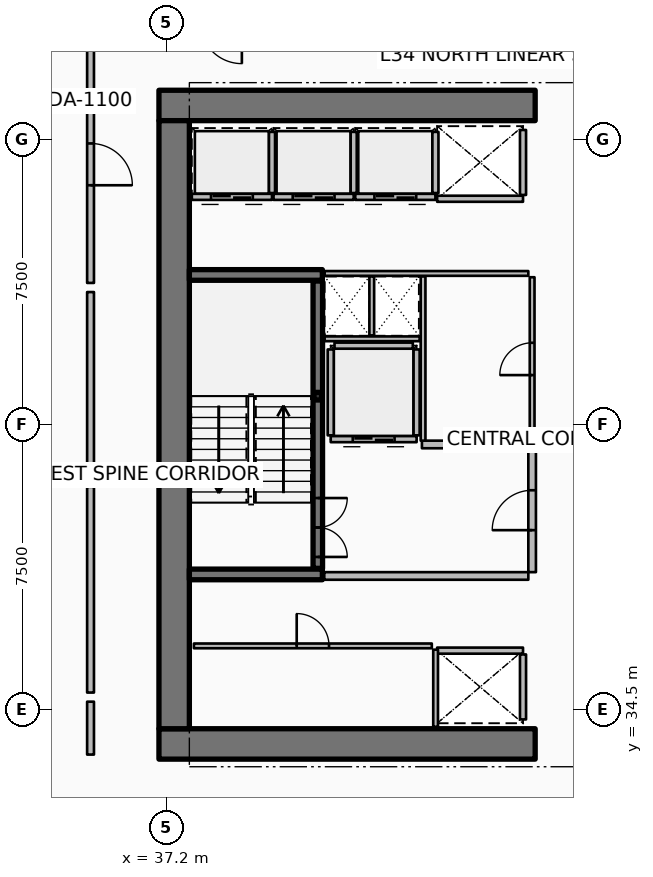
"""IFC4 building model, lengths in metres.
Left out: names, types, materials, properties, quantities, classifications, styles, units other than length and angle.
Written with IfcOpenShell. Run it as: python <this file> out.ifc"""

import sys

from ifc_helpers import new_model, si_unit, direction, frame, frame_2d, origin, origin_2d, place, context, subcontext, project, spatial, rectangle, hollow_rectangle, extrude, element, fill, save


model = new_model("IFC4")
c1 = context("Model", 3, precision=1e-05, world=origin(), true_north=direction((0.0, 1.0)))
c2 = subcontext(c1, "Body", "Model", "MODEL_VIEW")
j1 = project(units=[si_unit("LENGTHUNIT", "METRE"), si_unit("PLANEANGLEUNIT", "RADIAN")], contexts=[c1])
p1 = place(None, origin())
s1 = spatial("IfcSite", under=j1, at=p1, CompositionType="ELEMENT")
p2 = place(p1, origin())
s2 = spatial("IfcBuilding", under=s1, at=p2, CompositionType="ELEMENT")
p3 = place(p2, frame((0.0, 0.0, 139.05)))
s3 = spatial("IfcBuildingStorey", under=s2, at=p3, CompositionType="ELEMENT", Elevation=139.05)
for number, where, z_axis, x_axis in (
    (1, (37.0, 33.6, 0.0), (0.0, 0.0, 1.0), (1.0, 0.0, 0.0)),
    (2, (37.0, 50.4, 0.0), (0.0, 0.0, 1.0), (1.0, 0.0, 0.0)),
):
    element("IfcWall", number, at=place(p3, frame(where, z_axis=z_axis, x_axis=x_axis)), inside=s3, PredefinedType="SHEAR", context=c2, shape_type="SweptSolid", body=[
        extrude(rectangle(XDim=9.9, YDim=0.8, at=frame_2d((4.95, 0.0))), origin(), (0.0, 0.0, 1.0), 3.75),
    ])
p4 = place(p3, frame((37.4, 34.0, 0.0), z_axis=(0.0, 0.0, 1.0), x_axis=(0.0, 1.0, 0.0)))
e3 = element("IfcWall", 3, at=p4, inside=s3, PredefinedType="SHEAR", context=c2, shape_type="SweptSolid", body=[
    extrude(rectangle(XDim=16.0, YDim=0.8, at=frame_2d((8.0, 0.0))), origin(), (0.0, 0.0, 1.0), 3.75),
])
for number, where, z_axis, x_axis in (
    (4, (37.8, 38.06, 0.0), (0.0, 0.0, 1.0), (1.0, 0.0, 0.0)),
    (5, (37.8, 45.94, 0.0), (0.0, 0.0, 1.0), (1.0, 0.0, 0.0)),
):
    element("IfcWall", number, at=place(p3, frame(where, z_axis=z_axis, x_axis=x_axis)), inside=s3, PredefinedType="SHEAR", context=c2, shape_type="SweptSolid", body=[
        extrude(rectangle(XDim=3.5, YDim=0.28, at=frame_2d((1.75, 0.0))), origin(), (0.0, 0.0, 1.0), 3.75),
    ])
p5 = place(p3, frame((41.18, 42.75, 0.0), z_axis=(0.0, 0.0, 1.0), x_axis=(1.0, 0.0, 0.0)))
e6 = element("IfcColumn", 6, at=p5, inside=s3, PredefinedType="COLUMN", context=c2, shape_type="SweptSolid", body=[
    extrude(hollow_rectangle(XDim=0.2, YDim=0.2, WallThickness=0.01, InnerFilletRadius=0.01, OuterFilletRadius=0.02, at=origin_2d()), origin(), (0.0, 0.0, 1.0), 1.67),
])
p6 = place(p3, frame((41.18, 38.22, 0.0), z_axis=(0.0, 0.0, 1.0), x_axis=(0.0, 1.0, 0.0)))
e7 = element("IfcWall", 7, at=p6, inside=s3, PredefinedType="SOLIDWALL", context=c2, shape_type="SweptSolid", body=[
    extrude(rectangle(XDim=7.56, YDim=0.25, at=frame_2d((3.78, 0.0))), origin(), (0.0, 0.0, 1.0), 3.5),
])
p7 = place(p6, frame((0.3, 0.0, 0.0)))
e8 = element("IfcOpeningElement", 8, at=p7, cuts=e7, PredefinedType="OPENING", context=c2, shape_type="SweptSolid", body=[
    extrude(rectangle(XDim=1.55, YDim=2.15, at=frame_2d((0.775, 1.075))), frame((0.0, 0.135, 0.0), z_axis=(0.0, -1.0, 0.0), x_axis=(1.0, 0.0, 0.0)), (0.0, 0.0, 1.0), 0.27),
])
p8 = place(p3, frame((39.975, 47.995, 0.0), z_axis=(0.0, 0.0, 1.0), x_axis=(-1.0, 0.0, 0.0)))
e9 = element("IfcWall", 9, at=p8, inside=s3, PredefinedType="PARTITIONING", context=c2, shape_type="SweptSolid", body=[
    extrude(rectangle(XDim=2.11, YDim=0.16, at=frame_2d((1.055, 0.0))), origin(), (0.0, 0.0, 1.0), 3.5),
])
p9 = place(p8, frame((0.505, 0.0, 0.0)))
e10 = element("IfcOpeningElement", 10, at=p9, cuts=e9, PredefinedType="OPENING", context=c2, shape_type="SweptSolid", body=[
    extrude(rectangle(XDim=1.1, YDim=2.1, at=frame_2d((0.55, 1.05))), frame((0.0, 0.09, 0.0), z_axis=(0.0, -1.0, 0.0), x_axis=(1.0, 0.0, 0.0)), (0.0, 0.0, 1.0), 0.18),
])
p10 = place(p3, frame((39.975, 48.095, 0.0), z_axis=(0.0, 0.0, 1.0), x_axis=(0.0, 1.0, 0.0)))
e11 = element("IfcWall", 11, at=p10, inside=s3, PredefinedType="PARTITIONING", context=c2, shape_type="SweptSolid", body=[
    extrude(rectangle(XDim=1.61, YDim=0.16, at=frame_2d((0.805, 0.0))), origin(), (0.0, 0.0, 1.0), 3.5),
])
p11 = place(p3, frame((42.125, 47.995, 0.0), z_axis=(0.0, 0.0, 1.0), x_axis=(-1.0, 0.0, 0.0)))
e12 = element("IfcWall", 12, at=p11, inside=s3, PredefinedType="PARTITIONING", context=c2, shape_type="SweptSolid", body=[
    extrude(rectangle(XDim=2.11, YDim=0.16, at=frame_2d((1.055, 0.0))), origin(), (0.0, 0.0, 1.0), 3.5),
])
p12 = place(p11, frame((0.505, 0.0, 0.0)))
e13 = element("IfcOpeningElement", 13, at=p12, cuts=e12, PredefinedType="OPENING", context=c2, shape_type="SweptSolid", body=[
    extrude(rectangle(XDim=1.1, YDim=2.1, at=frame_2d((0.55, 1.05))), frame((0.0, 0.09, 0.0), z_axis=(0.0, -1.0, 0.0), x_axis=(1.0, 0.0, 0.0)), (0.0, 0.0, 1.0), 0.18),
])
p13 = place(p3, frame((42.125, 48.095, 0.0), z_axis=(0.0, 0.0, 1.0), x_axis=(0.0, 1.0, 0.0)))
e14 = element("IfcWall", 14, at=p13, inside=s3, PredefinedType="PARTITIONING", context=c2, shape_type="SweptSolid", body=[
    extrude(rectangle(XDim=1.61, YDim=0.16, at=frame_2d((0.805, 0.0))), origin(), (0.0, 0.0, 1.0), 3.5),
])
p14 = place(p3, frame((44.275, 47.995, 0.0), z_axis=(0.0, 0.0, 1.0), x_axis=(-1.0, 0.0, 0.0)))
e15 = element("IfcWall", 15, at=p14, inside=s3, PredefinedType="PARTITIONING", context=c2, shape_type="SweptSolid", body=[
    extrude(rectangle(XDim=2.11, YDim=0.16, at=frame_2d((1.055, 0.0))), origin(), (0.0, 0.0, 1.0), 3.5),
])
p15 = place(p14, frame((0.505, 0.0, 0.0)))
e16 = element("IfcOpeningElement", 16, at=p15, cuts=e15, PredefinedType="OPENING", context=c2, shape_type="SweptSolid", body=[
    extrude(rectangle(XDim=1.1, YDim=2.1, at=frame_2d((0.55, 1.05))), frame((0.0, 0.09, 0.0), z_axis=(0.0, -1.0, 0.0), x_axis=(1.0, 0.0, 0.0)), (0.0, 0.0, 1.0), 0.18),
])
p16 = place(p3, frame((44.275, 48.095, 0.0), z_axis=(0.0, 0.0, 1.0), x_axis=(0.0, 1.0, 0.0)))
e17 = element("IfcWall", 17, at=p16, inside=s3, PredefinedType="PARTITIONING", context=c2, shape_type="SweptSolid", body=[
    extrude(rectangle(XDim=1.61, YDim=0.16, at=frame_2d((0.805, 0.0))), origin(), (0.0, 0.0, 1.0), 3.5),
])
p17 = place(p3, frame((46.58, 47.945, 0.0), z_axis=(0.0, 0.0, 1.0), x_axis=(-1.0, 0.0, 0.0)))
e18 = element("IfcWall", 18, at=p17, inside=s3, PredefinedType="PARTITIONING", context=c2, shape_type="SweptSolid", body=[
    extrude(rectangle(XDim=2.26, YDim=0.16, at=frame_2d((1.13, 0.0))), origin(), (0.0, 0.0, 1.0), 3.5),
])
p18 = place(p3, frame((46.58, 48.045, 0.0), z_axis=(0.0, 0.0, 1.0), x_axis=(0.0, 1.0, 0.0)))
e19 = element("IfcWall", 19, at=p18, inside=s3, PredefinedType="PARTITIONING", context=c2, shape_type="SweptSolid", body=[
    extrude(rectangle(XDim=1.71, YDim=0.16, at=frame_2d((0.855, 0.0))), origin(), (0.0, 0.0, 1.0), 3.5),
])
p19 = place(p3, frame((44.32, 36.055, 0.0), z_axis=(0.0, 0.0, 1.0), x_axis=(1.0, 0.0, 0.0)))
e20 = element("IfcWall", 20, at=p19, inside=s3, PredefinedType="PARTITIONING", context=c2, shape_type="SweptSolid", body=[
    extrude(rectangle(XDim=2.26, YDim=0.16, at=frame_2d((1.13, 0.0))), origin(), (0.0, 0.0, 1.0), 3.5),
])
p20 = place(p3, frame((46.58, 34.245, 0.0), z_axis=(0.0, 0.0, 1.0), x_axis=(0.0, 1.0, 0.0)))
e21 = element("IfcWall", 21, at=p20, inside=s3, PredefinedType="PARTITIONING", context=c2, shape_type="SweptSolid", body=[
    extrude(rectangle(XDim=1.71, YDim=0.16, at=frame_2d((0.855, 0.0))), origin(), (0.0, 0.0, 1.0), 3.5),
])
p21 = place(p3, frame((43.78, 41.62, 0.0), z_axis=(0.0, 0.0, 1.0), x_axis=(-1.0, 0.0, 0.0)))
e22 = element("IfcWall", 22, at=p21, inside=s3, PredefinedType="PARTITIONING", context=c2, shape_type="SweptSolid", body=[
    extrude(rectangle(XDim=2.26, YDim=0.16, at=frame_2d((1.13, 0.0))), origin(), (0.0, 0.0, 1.0), 3.5),
])
p22 = place(p21, frame((0.58, 0.0, 0.0)))
e23 = element("IfcOpeningElement", 23, at=p22, cuts=e22, PredefinedType="OPENING", context=c2, shape_type="SweptSolid", body=[
    extrude(rectangle(XDim=1.1, YDim=2.1, at=frame_2d((0.55, 1.05))), frame((0.0, 0.09, 0.0), z_axis=(0.0, -1.0, 0.0), x_axis=(1.0, 0.0, 0.0)), (0.0, 0.0, 1.0), 0.18),
])
for number, where, z_axis, x_axis in (
    (24, (43.78, 41.72, 0.0), (0.0, 0.0, 1.0), (0.0, 1.0, 0.0)),
    (25, (41.52, 41.72, 0.0), (0.0, 0.0, 1.0), (0.0, 1.0, 0.0)),
):
    element("IfcWall", number, at=place(p3, frame(where, z_axis=z_axis, x_axis=x_axis)), inside=s3, PredefinedType="PARTITIONING", context=c2, shape_type="SweptSolid", body=[
        extrude(rectangle(XDim=2.26, YDim=0.16, at=frame_2d((1.13, 0.0))), origin(), (0.0, 0.0, 1.0), 3.5),
    ])
p23 = place(p3, frame((41.62, 44.08, 0.0), z_axis=(0.0, 0.0, 1.0), x_axis=(1.0, 0.0, 0.0)))
e26 = element("IfcWall", 26, at=p23, inside=s3, PredefinedType="PARTITIONING", context=c2, shape_type="SweptSolid", body=[
    extrude(rectangle(XDim=2.06, YDim=0.16, at=frame_2d((1.03, 0.0))), origin(), (0.0, 0.0, 1.0), 3.5),
])
p24 = place(p3, frame((44.28, 34.05, 0.0), z_axis=(0.0, 0.0, 1.0), x_axis=(0.0, 1.0, 0.0)))
e27 = element("IfcWall", 27, at=p24, inside=s3, PredefinedType="PARTITIONING", context=c2, shape_type="SweptSolid", body=[
    extrude(rectangle(XDim=2.03, YDim=0.125, at=frame_2d((1.015, 0.0))), origin(), (0.0, 0.0, 1.0), 2.94),
])
p25 = place(p3, frame((37.92, 36.18, 0.0), z_axis=(0.0, 0.0, 1.0), x_axis=(1.0, 0.0, 0.0)))
e28 = element("IfcWall", 28, at=p25, inside=s3, PredefinedType="PARTITIONING", context=c2, shape_type="SweptSolid", body=[
    extrude(rectangle(XDim=6.26, YDim=0.125, at=frame_2d((3.13, 0.0))), origin(), (0.0, 0.0, 1.0), 2.94),
])
p26 = place(p25, frame((2.705, 0.0, 0.0)))
e29 = element("IfcOpeningElement", 29, at=p26, cuts=e28, PredefinedType="OPENING", context=c2, shape_type="SweptSolid", body=[
    extrude(rectangle(XDim=0.85, YDim=2.06, at=frame_2d((0.425, 1.03))), frame((0.0, 0.073, 0.0), z_axis=(0.0, -1.0, 0.0), x_axis=(1.0, 0.0, 0.0)), (0.0, 0.0, 1.0), 0.145),
])
p27 = place(p3, frame((41.35, 38.02, 0.0), z_axis=(0.0, 0.0, 1.0), x_axis=(1.0, 0.0, 0.0)))
e30 = element("IfcWall", 30, at=p27, inside=s3, PredefinedType="PARTITIONING", context=c2, shape_type="SweptSolid", body=[
    extrude(rectangle(XDim=5.37, YDim=0.2, at=frame_2d((2.685, 0.0))), origin(), (0.0, 0.0, 1.0), 3.5),
])
p28 = place(p3, frame((43.92, 41.48, 0.0), z_axis=(0.0, 0.0, 1.0), x_axis=(1.0, 0.0, 0.0)))
e31 = element("IfcWall", 31, at=p28, inside=s3, PredefinedType="PARTITIONING", context=c2, shape_type="SweptSolid", body=[
    extrude(rectangle(XDim=2.8, YDim=0.2, at=frame_2d((1.4, 0.0))), origin(), (0.0, 0.0, 1.0), 3.5),
])
p29 = place(p3, frame((46.82, 38.12, 0.0), z_axis=(0.0, 0.0, 1.0), x_axis=(0.0, 1.0, 0.0)))
e32 = element("IfcWall", 32, at=p29, inside=s3, PredefinedType="PARTITIONING", context=c2, shape_type="SweptSolid", body=[
    extrude(rectangle(XDim=3.26, YDim=0.2, at=frame_2d((1.63, 0.0))), origin(), (0.0, 0.0, 1.0), 3.5),
])
p30 = place(p29, frame((1.105, 0.0, 0.0)))
e33 = element("IfcOpeningElement", 33, at=p30, cuts=e32, PredefinedType="OPENING", context=c2, shape_type="SweptSolid", body=[
    extrude(rectangle(XDim=1.05, YDim=2.1, at=frame_2d((0.525, 1.05))), frame((0.0, 0.11, 0.0), z_axis=(0.0, -1.0, 0.0), x_axis=(1.0, 0.0, 0.0)), (0.0, 0.0, 1.0), 0.22),
])
p31 = place(p3, frame((41.36, 45.98, 0.0), z_axis=(0.0, 0.0, 1.0), x_axis=(1.0, 0.0, 0.0)))
e34 = element("IfcWall", 34, at=p31, inside=s3, PredefinedType="PARTITIONING", context=c2, shape_type="SweptSolid", body=[
    extrude(rectangle(XDim=5.36, YDim=0.125, at=frame_2d((2.68, 0.0))), origin(), (0.0, 0.0, 1.0), 2.94),
])
p32 = place(p3, frame((41.36, 44.26, 0.0), z_axis=(0.0, 0.0, 1.0), x_axis=(1.0, 0.0, 0.0)))
e35 = element("IfcWall", 35, at=p32, inside=s3, PredefinedType="PARTITIONING", context=c2, shape_type="SweptSolid", body=[
    extrude(rectangle(XDim=2.5, YDim=0.125, at=frame_2d((1.25, 0.0))), origin(), (0.0, 0.0, 1.0), 2.94),
])
p33 = place(p3, frame((42.6, 44.35, 0.0), z_axis=(0.0, 0.0, 1.0), x_axis=(0.0, 1.0, 0.0)))
e36 = element("IfcWall", 36, at=p33, inside=s3, PredefinedType="PARTITIONING", context=c2, shape_type="SweptSolid", body=[
    extrude(rectangle(XDim=1.55, YDim=0.125, at=frame_2d((0.775, 0.0))), origin(), (0.0, 0.0, 1.0), 2.94),
])
p34 = place(p3, frame((43.95, 41.58, 0.0), z_axis=(0.0, 0.0, 1.0), x_axis=(0.0, 1.0, 0.0)))
e37 = element("IfcWall", 37, at=p34, inside=s3, PredefinedType="PARTITIONING", context=c2, shape_type="SweptSolid", body=[
    extrude(rectangle(XDim=4.32, YDim=0.125, at=frame_2d((2.16, 0.0))), origin(), (0.0, 0.0, 1.0), 2.94),
])
p35 = place(p3, frame((46.82, 41.58, 0.0), z_axis=(0.0, 0.0, 1.0), x_axis=(0.0, 1.0, 0.0)))
e38 = element("IfcWall", 38, at=p35, inside=s3, PredefinedType="PARTITIONING", context=c2, shape_type="SweptSolid", body=[
    extrude(rectangle(XDim=4.3, YDim=0.125, at=frame_2d((2.15, 0.0))), origin(), (0.0, 0.0, 1.0), 2.94),
])
p36 = place(p35, frame((1.725, 0.0, 0.0)))
e39 = element("IfcOpeningElement", 39, at=p36, cuts=e38, PredefinedType="OPENING", context=c2, shape_type="SweptSolid", body=[
    extrude(rectangle(XDim=0.85, YDim=2.06, at=frame_2d((0.425, 1.03))), frame((0.0, 0.073, 0.0), z_axis=(0.0, -1.0, 0.0), x_axis=(1.0, 0.0, 0.0)), (0.0, 0.0, 1.0), 0.145),
])
p37 = place(p3, frame((35.2, 51.971, 0.0), z_axis=(0.0, 0.0, 1.0), x_axis=(0.0, -1.0, 0.0)))
e40 = element("IfcWall", 40, at=p37, inside=s3, PredefinedType="PARTITIONING", context=c2, shape_type="SweptSolid", body=[
    extrude(rectangle(XDim=6.241, YDim=0.18, at=frame_2d((3.12, 0.0))), origin(), (0.0, 0.0, 1.0), 2.94),
])
p38 = place(p37, frame((2.57, 0.0, 0.0)))
e41 = element("IfcOpeningElement", 41, at=p38, cuts=e40, PredefinedType="OPENING", context=c2, shape_type="SweptSolid", body=[
    extrude(rectangle(XDim=1.1, YDim=2.1, at=frame_2d((0.55, 1.05))), frame((0.0, 0.1, 0.0), z_axis=(0.0, -1.0, 0.0), x_axis=(1.0, 0.0, 0.0)), (0.0, 0.0, 1.0), 0.2),
])
p39 = place(p3, frame((35.2, 45.49, 0.0), z_axis=(0.0, 0.0, 1.0), x_axis=(0.0, -1.0, 0.0)))
e42 = element("IfcWall", 42, at=p39, inside=s3, PredefinedType="PARTITIONING", context=c2, shape_type="SweptSolid", body=[
    extrude(rectangle(XDim=4.885, YDim=0.18, at=frame_2d((2.442, 0.0))), origin(), (0.0, 0.0, 1.0), 2.94),
])
p40 = place(p3, frame((35.2, 40.365, 0.0), z_axis=(0.0, 0.0, 1.0), x_axis=(0.0, -1.0, 0.0)))
e43 = element("IfcWall", 43, at=p40, inside=s3, PredefinedType="PARTITIONING", context=c2, shape_type="SweptSolid", body=[
    extrude(rectangle(XDim=5.413, YDim=0.18, at=frame_2d((2.707, 0.0))), origin(), (0.0, 0.0, 1.0), 2.94),
])
p41 = place(p3, frame((35.2, 34.712, 0.0), z_axis=(0.0, 0.0, 1.0), x_axis=(0.0, -1.0, 0.0)))
e44 = element("IfcWall", 44, at=p41, inside=s3, PredefinedType="PARTITIONING", context=c2, shape_type="SweptSolid", body=[
    extrude(rectangle(XDim=1.392, YDim=0.18, at=frame_2d((0.696, 0.0))), origin(), (0.0, 0.0, 1.0), 2.94),
])
p42 = place(p7, origin())
e45 = element("IfcDoor", 45, at=p42, inside=s3, OperationType="DOUBLE_DOOR_SINGLE_SWING", PredefinedType="DOOR", context=c2, shape_type="SweptSolid", body=[
    extrude(rectangle(XDim=1.55, YDim=2.15, at=frame_2d((0.775, 1.075))), frame((0.0, 0.025, 0.0), z_axis=(0.0, -1.0, 0.0), x_axis=(1.0, 0.0, 0.0)), (0.0, 0.0, 1.0), 0.05),
])
fill(e8, e45)
p43 = place(p9, origin())
e46 = element("IfcDoor", 46, at=p43, inside=s3, OperationType="DOUBLE_DOOR_SLIDING", PredefinedType="DOOR", context=c2, shape_type="SweptSolid", body=[
    extrude(rectangle(XDim=1.1, YDim=2.1, at=frame_2d((0.55, 1.05))), frame((0.0, 0.025, 0.0), z_axis=(0.0, -1.0, 0.0), x_axis=(1.0, 0.0, 0.0)), (0.0, 0.0, 1.0), 0.05),
])
fill(e10, e46)
p44 = place(p12, origin())
e47 = element("IfcDoor", 47, at=p44, inside=s3, OperationType="DOUBLE_DOOR_SLIDING", PredefinedType="DOOR", context=c2, shape_type="SweptSolid", body=[
    extrude(rectangle(XDim=1.1, YDim=2.1, at=frame_2d((0.55, 1.05))), frame((0.0, 0.025, 0.0), z_axis=(0.0, -1.0, 0.0), x_axis=(1.0, 0.0, 0.0)), (0.0, 0.0, 1.0), 0.05),
])
fill(e13, e47)
p45 = place(p15, origin())
e48 = element("IfcDoor", 48, at=p45, inside=s3, OperationType="DOUBLE_DOOR_SLIDING", PredefinedType="DOOR", context=c2, shape_type="SweptSolid", body=[
    extrude(rectangle(XDim=1.1, YDim=2.1, at=frame_2d((0.55, 1.05))), frame((0.0, 0.025, 0.0), z_axis=(0.0, -1.0, 0.0), x_axis=(1.0, 0.0, 0.0)), (0.0, 0.0, 1.0), 0.05),
])
fill(e16, e48)
p46 = place(p22, origin())
e49 = element("IfcDoor", 49, at=p46, inside=s3, OperationType="DOUBLE_DOOR_SLIDING", PredefinedType="DOOR", context=c2, shape_type="SweptSolid", body=[
    extrude(rectangle(XDim=1.1, YDim=2.1, at=frame_2d((0.55, 1.05))), frame((0.0, 0.025, 0.0), z_axis=(0.0, -1.0, 0.0), x_axis=(1.0, 0.0, 0.0)), (0.0, 0.0, 1.0), 0.05),
])
fill(e23, e49)
p47 = place(p26, origin())
e50 = element("IfcDoor", 50, at=p47, inside=s3, OperationType="SINGLE_SWING_LEFT", PredefinedType="DOOR", context=c2, shape_type="SweptSolid", body=[
    extrude(rectangle(XDim=0.85, YDim=2.06, at=frame_2d((0.425, 1.03))), frame((0.0, 0.025, 0.0), z_axis=(0.0, -1.0, 0.0), x_axis=(1.0, 0.0, 0.0)), (0.0, 0.0, 1.0), 0.05),
])
fill(e29, e50)
p48 = place(p30, origin())
e51 = element("IfcDoor", 51, at=p48, inside=s3, OperationType="SINGLE_SWING_LEFT", PredefinedType="DOOR", context=c2, shape_type="SweptSolid", body=[
    extrude(rectangle(XDim=1.05, YDim=2.1, at=frame_2d((0.525, 1.05))), frame((0.0, 0.025, 0.0), z_axis=(0.0, -1.0, 0.0), x_axis=(1.0, 0.0, 0.0)), (0.0, 0.0, 1.0), 0.05),
])
fill(e33, e51)
p49 = place(p36, origin())
e52 = element("IfcDoor", 52, at=p49, inside=s3, OperationType="SINGLE_SWING_LEFT", PredefinedType="DOOR", context=c2, shape_type="SweptSolid", body=[
    extrude(rectangle(XDim=0.85, YDim=2.06, at=frame_2d((0.425, 1.03))), frame((0.0, 0.025, 0.0), z_axis=(0.0, -1.0, 0.0), x_axis=(1.0, 0.0, 0.0)), (0.0, 0.0, 1.0), 0.05),
])
fill(e39, e52)
p50 = place(p38, origin())
e53 = element("IfcDoor", 53, at=p50, inside=s3, OperationType="SINGLE_SWING_RIGHT", PredefinedType="DOOR", context=c2, shape_type="SweptSolid", body=[
    extrude(rectangle(XDim=1.1, YDim=2.1, at=frame_2d((0.55, 1.05))), frame((0.0, 0.025, 0.0), z_axis=(0.0, -1.0, 0.0), x_axis=(1.0, 0.0, 0.0)), (0.0, 0.0, 1.0), 0.05),
])
fill(e41, e53)
save(model, sys.argv[1])
